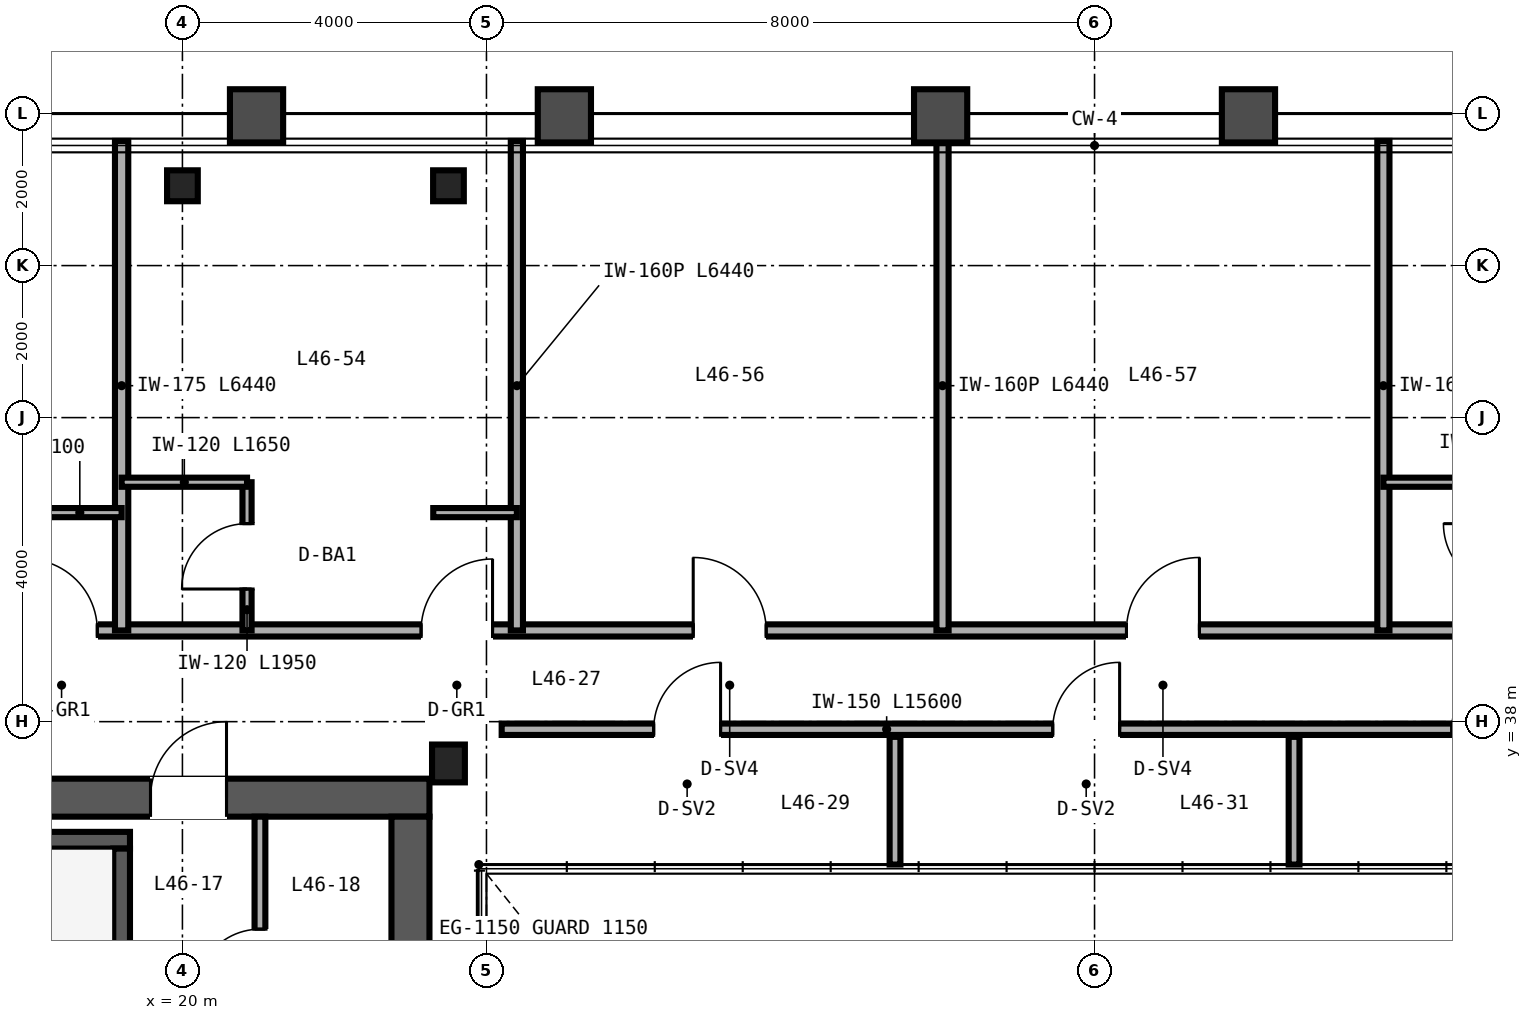
"""IFC4 building model, lengths in metres.
Left out: names, types, materials, properties, quantities, classifications, styles, units other than length and angle.
Written with IfcOpenShell. Run it as: python <this file> out.ifc"""

import sys

from ifc_helpers import new_model, si_unit, direction, frame, frame_2d, origin, origin_2d, place, context, subcontext, project, spatial, rectangle, i_section, extrude, source, transform, mapped, element, fill, save


model = new_model("IFC4")
c1 = context("Model", 3, precision=1e-05, world=origin(), true_north=direction((0.0, 1.0)))
c2 = subcontext(c1, "Body", "Model", "MODEL_VIEW")
j1 = project(units=[si_unit("LENGTHUNIT", "METRE"), si_unit("PLANEANGLEUNIT", "RADIAN")], contexts=[c1])
p1 = place(None, origin())
s1 = spatial("IfcSite", under=j1, at=p1, CompositionType="ELEMENT")
p2 = place(p1, origin())
s2 = spatial("IfcBuilding", under=s1, at=p2, CompositionType="ELEMENT")
p3 = place(p2, frame((0.0, 0.0, 184.8)))
s3 = spatial("IfcBuildingStorey", under=s2, at=p3, CompositionType="ELEMENT", Elevation=184.8)
p4 = place(p3, frame((10.75, 37.0, 0.0), z_axis=(0.0, 0.0, 1.0), x_axis=(1.0, 0.0, 0.0)))
e1 = element("IfcWall", 1, at=p4, inside=s3, PredefinedType="SHEAR", context=c2, shape_type="SweptSolid", body=[
    extrude(rectangle(XDim=12.5, YDim=0.5, at=frame_2d((6.25, 0.0))), origin(), (0.0, 0.0, 1.0), 3.37),
])
p5 = place(p4, frame((8.83, 0.0, 0.0)))
e2 = element("IfcOpeningElement", 2, at=p5, cuts=e1, PredefinedType="OPENING", context=c2, shape_type="SweptSolid", body=[
    extrude(rectangle(XDim=1.0, YDim=2.15, at=frame_2d((0.5, 1.075))), frame((0.0, 0.26, 0.0), z_axis=(0.0, -1.0, 0.0), x_axis=(1.0, 0.0, 0.0)), (0.0, 0.0, 1.0), 0.52),
])
p6 = place(p3, frame((23.0, 15.25, 0.0), z_axis=(0.0, 0.0, 1.0), x_axis=(0.0, 1.0, 0.0)))
e3 = element("IfcWall", 3, at=p6, inside=s3, PredefinedType="SHEAR", context=c2, shape_type="SweptSolid", body=[
    extrude(rectangle(XDim=21.5, YDim=0.5, at=frame_2d((10.75, 0.0))), origin(), (0.0, 0.0, 1.0), 3.37),
])
p7 = place(p3, frame((11.25, 36.44, 0.0), z_axis=(0.0, 0.0, 1.0), x_axis=(1.0, 0.0, 0.0)))
e4 = element("IfcWall", 4, at=p7, inside=s3, PredefinedType="SHEAR", context=c2, shape_type="SweptSolid", body=[
    extrude(rectangle(XDim=8.06, YDim=0.22, at=frame_2d((4.03, 0.0))), origin(), (0.0, 0.0, 1.0), 3.4),
])
p8 = place(p3, frame((19.2, 33.05, 0.0), z_axis=(0.0, 0.0, 1.0), x_axis=(0.0, 1.0, 0.0)))
e5 = element("IfcWall", 5, at=p8, inside=s3, PredefinedType="SHEAR", context=c2, shape_type="SweptSolid", body=[
    extrude(rectangle(XDim=3.28, YDim=0.22, at=frame_2d((1.64, 0.0))), origin(), (0.0, 0.0, 1.0), 3.4),
])
m1 = source(origin(), c2, "Body", "SweptSolid", [
    extrude(i_section(OverallWidth=0.432, OverallDepth=0.498, WebThickness=0.056, FlangeThickness=0.089, FilletRadius=0.025, at=origin_2d()), origin(), (0.0, 0.0, 1.0), 3.37),
])
p9 = place(p3, frame((23.5, 37.45, 0.0), z_axis=(0.0, 0.0, 1.0), x_axis=(1.0, 0.0, 0.0)))
e6 = element("IfcColumn", 6, at=p9, inside=s3, PredefinedType="COLUMN", context=c2, shape_type="MappedRepresentation", body=[
    mapped(m1, transform((0.0, 0.0, 0.0), scale=1.0)),
])
m2 = source(origin(), c2, "Body", "SweptSolid", [
    extrude(i_section(OverallWidth=0.404, OverallDepth=0.407, WebThickness=0.027, FlangeThickness=0.044, FilletRadius=0.025, at=origin_2d()), origin(), (0.0, 0.0, 1.0), 3.37),
])
for number, where, z_axis, x_axis in (
    (7, (20.0, 45.05, 0.0), (0.0, 0.0, 1.0), (1.0, 0.0, 0.0)),
    (8, (23.5, 45.05, 0.0), (0.0, 0.0, 1.0), (1.0, 0.0, 0.0)),
):
    element("IfcColumn", number, at=place(p3, frame(where, z_axis=z_axis, x_axis=x_axis)), inside=s3, PredefinedType="COLUMN", context=c2, shape_type="MappedRepresentation", body=[
        mapped(m2, transform((0.0, 0.0, 0.0), scale=1.0)),
    ])
p10 = place(p3, frame((21.02, 33.28, 0.0), z_axis=(0.0, 0.0, 1.0), x_axis=(0.0, 1.0, 0.0)))
e9 = element("IfcWall", 9, at=p10, inside=s3, PredefinedType="PARTITIONING", context=c2, shape_type="SweptSolid", body=[
    extrude(rectangle(XDim=3.47, YDim=0.142, at=frame_2d((1.735, 0.0))), origin(), (0.0, 0.0, 1.0), 3.37),
])
p11 = place(p10, frame((1.15, 0.0, 0.0)))
e10 = element("IfcOpeningElement", 10, at=p11, cuts=e9, PredefinedType="OPENING", context=c2, shape_type="SweptSolid", body=[
    extrude(rectangle(XDim=0.84, YDim=2.1, at=frame_2d((0.42, 1.05))), frame((0.0, 0.081, 0.0), z_axis=(0.0, -1.0, 0.0), x_axis=(1.0, 0.0, 0.0)), (0.0, 0.0, 1.0), 0.162),
])
p12 = place(p3, frame((24.2, 37.9, 0.0), z_axis=(0.0, 0.0, 1.0), x_axis=(1.0, 0.0, 0.0)))
e11 = element("IfcWall", 11, at=p12, inside=s3, PredefinedType="PARTITIONING", context=c2, shape_type="SweptSolid", body=[
    extrude(rectangle(XDim=15.6, YDim=0.15, at=frame_2d((7.8, 0.0))), origin(), (0.0, 0.0, 1.0), 3.37),
])
p13 = place(p12, frame((2.0, 0.0, 0.0)))
e12 = element("IfcOpeningElement", 12, at=p13, cuts=e11, PredefinedType="OPENING", context=c2, shape_type="SweptSolid", body=[
    extrude(rectangle(XDim=0.88, YDim=2.15, at=frame_2d((0.44, 1.075))), frame((0.0, 0.085, 0.0), z_axis=(0.0, -1.0, 0.0), x_axis=(1.0, 0.0, 0.0)), (0.0, 0.0, 1.0), 0.17),
])
p14 = place(p12, frame((7.25, 0.0, 0.0)))
e13 = element("IfcOpeningElement", 13, at=p14, cuts=e11, PredefinedType="OPENING", context=c2, shape_type="SweptSolid", body=[
    extrude(rectangle(XDim=0.88, YDim=2.15, at=frame_2d((0.44, 1.075))), frame((0.0, 0.085, 0.0), z_axis=(0.0, -1.0, 0.0), x_axis=(1.0, 0.0, 0.0)), (0.0, 0.0, 1.0), 0.17),
])
p15 = place(p12, frame((12.5, 0.0, 0.0)))
e14 = element("IfcOpeningElement", 14, at=p15, cuts=e11, PredefinedType="OPENING", context=c2, shape_type="SweptSolid", body=[
    extrude(rectangle(XDim=0.88, YDim=2.15, at=frame_2d((0.44, 1.075))), frame((0.0, 0.085, 0.0), z_axis=(0.0, -1.0, 0.0), x_axis=(1.0, 0.0, 0.0)), (0.0, 0.0, 1.0), 0.17),
])
for number, where, z_axis, x_axis in (
    (15, (29.375, 36.12, 0.0), (0.0, 0.0, 1.0), (0.0, 1.0, 0.0)),
    (16, (34.625, 36.12, 0.0), (0.0, 0.0, 1.0), (0.0, 1.0, 0.0)),
):
    element("IfcWall", number, at=place(p3, frame(where, z_axis=z_axis, x_axis=x_axis)), inside=s3, PredefinedType="PARTITIONING", context=c2, shape_type="SweptSolid", body=[
        extrude(rectangle(XDim=1.68, YDim=0.142, at=frame_2d((0.84, 0.0))), origin(), (0.0, 0.0, 1.0), 3.37),
    ])
p16 = place(p3, frame((14.0, 39.2, 0.0), z_axis=(0.0, 0.0, 1.0), x_axis=(1.0, 0.0, 0.0)))
e17 = element("IfcWall", 17, at=p16, inside=s3, PredefinedType="PARTITIONING", context=c2, shape_type="SweptSolid", body=[
    extrude(rectangle(XDim=36.0, YDim=0.16, at=frame_2d((18.0, 0.0))), origin(), (0.0, 0.0, 1.0), 2.913),
])
p17 = place(p16, frame((3.94, 0.0, 0.0)))
e18 = element("IfcOpeningElement", 18, at=p17, cuts=e17, PredefinedType="OPENING", context=c2, shape_type="SweptSolid", body=[
    extrude(rectangle(XDim=0.94, YDim=2.15, at=frame_2d((0.47, 1.075))), frame((0.0, 0.09, 0.0), z_axis=(0.0, -1.0, 0.0), x_axis=(1.0, 0.0, 0.0)), (0.0, 0.0, 1.0), 0.18),
])
p18 = place(p16, frame((9.14, 0.0, 0.0)))
e19 = element("IfcOpeningElement", 19, at=p18, cuts=e17, PredefinedType="OPENING", context=c2, shape_type="SweptSolid", body=[
    extrude(rectangle(XDim=0.94, YDim=2.15, at=frame_2d((0.47, 1.075))), frame((0.0, 0.09, 0.0), z_axis=(0.0, -1.0, 0.0), x_axis=(1.0, 0.0, 0.0)), (0.0, 0.0, 1.0), 0.18),
])
p19 = place(p16, frame((12.72, 0.0, 0.0)))
e20 = element("IfcOpeningElement", 20, at=p19, cuts=e17, PredefinedType="OPENING", context=c2, shape_type="SweptSolid", body=[
    extrude(rectangle(XDim=0.96, YDim=2.15, at=frame_2d((0.48, 1.075))), frame((0.0, 0.09, 0.0), z_axis=(0.0, -1.0, 0.0), x_axis=(1.0, 0.0, 0.0)), (0.0, 0.0, 1.0), 0.18),
])
p20 = place(p16, frame((18.42, 0.0, 0.0)))
e21 = element("IfcOpeningElement", 21, at=p20, cuts=e17, PredefinedType="OPENING", context=c2, shape_type="SweptSolid", body=[
    extrude(rectangle(XDim=0.96, YDim=2.15, at=frame_2d((0.48, 1.075))), frame((0.0, 0.09, 0.0), z_axis=(0.0, -1.0, 0.0), x_axis=(1.0, 0.0, 0.0)), (0.0, 0.0, 1.0), 0.18),
])
p21 = place(p16, frame((26.34, 0.0, 0.0)))
e22 = element("IfcOpeningElement", 22, at=p21, cuts=e17, PredefinedType="OPENING", context=c2, shape_type="SweptSolid", body=[
    extrude(rectangle(XDim=0.94, YDim=2.15, at=frame_2d((0.47, 1.075))), frame((0.0, 0.09, 0.0), z_axis=(0.0, -1.0, 0.0), x_axis=(1.0, 0.0, 0.0)), (0.0, 0.0, 1.0), 0.18),
])
p22 = place(p16, frame((30.54, 0.0, 0.0)))
e23 = element("IfcOpeningElement", 23, at=p22, cuts=e17, PredefinedType="OPENING", context=c2, shape_type="SweptSolid", body=[
    extrude(rectangle(XDim=0.94, YDim=2.15, at=frame_2d((0.47, 1.075))), frame((0.0, 0.09, 0.0), z_axis=(0.0, -1.0, 0.0), x_axis=(1.0, 0.0, 0.0)), (0.0, 0.0, 1.0), 0.18),
])
p23 = place(p16, frame((34.74, 0.0, 0.0)))
e24 = element("IfcOpeningElement", 24, at=p23, cuts=e17, PredefinedType="OPENING", context=c2, shape_type="SweptSolid", body=[
    extrude(rectangle(XDim=0.94, YDim=2.15, at=frame_2d((0.47, 1.075))), frame((0.0, 0.09, 0.0), z_axis=(0.0, -1.0, 0.0), x_axis=(1.0, 0.0, 0.0)), (0.0, 0.0, 1.0), 0.18),
])
p24 = place(p3, frame((19.2, 39.2, 0.0), z_axis=(0.0, 0.0, 1.0), x_axis=(0.0, 1.0, 0.0)))
e25 = element("IfcWall", 25, at=p24, inside=s3, PredefinedType="PARTITIONING", context=c2, shape_type="SweptSolid", body=[
    extrude(rectangle(XDim=6.44, YDim=0.175, at=frame_2d((3.22, 0.0))), origin(), (0.0, 0.0, 1.0), 2.677),
])
p25 = place(p3, frame((18.1, 40.75, 0.0), z_axis=(0.0, 0.0, 1.0), x_axis=(1.0, 0.0, 0.0)))
e26 = element("IfcWall", 26, at=p25, inside=s3, PredefinedType="PARTITIONING", context=c2, shape_type="SweptSolid", body=[
    extrude(rectangle(XDim=1.1, YDim=0.12, at=frame_2d((0.55, 0.0))), origin(), (0.0, 0.0, 1.0), 3.37),
])
p26 = place(p3, frame((24.4, 39.2, 0.0), z_axis=(0.0, 0.0, 1.0), x_axis=(0.0, 1.0, 0.0)))
e27 = element("IfcWall", 27, at=p26, inside=s3, PredefinedType="PARTITIONING", context=c2, shape_type="SweptSolid", body=[
    extrude(rectangle(XDim=6.44, YDim=0.16, at=frame_2d((3.22, 0.0))), origin(), (0.0, 0.0, 1.0), 2.443),
])
p27 = place(p3, frame((20.85, 39.2, 0.0), z_axis=(0.0, 0.0, 1.0), x_axis=(0.0, 1.0, 0.0)))
e28 = element("IfcWall", 28, at=p27, inside=s3, PredefinedType="PARTITIONING", context=c2, shape_type="SweptSolid", body=[
    extrude(rectangle(XDim=1.95, YDim=0.12, at=frame_2d((0.975, 0.0))), origin(), (0.0, 0.0, 1.0), 3.37),
])
p28 = place(p27, frame((0.545, 0.0, 0.0)))
e29 = element("IfcOpeningElement", 29, at=p28, cuts=e28, PredefinedType="OPENING", context=c2, shape_type="SweptSolid", body=[
    extrude(rectangle(XDim=0.86, YDim=2.1, at=frame_2d((0.43, 1.05))), frame((0.0, 0.07, 0.0), z_axis=(0.0, -1.0, 0.0), x_axis=(1.0, 0.0, 0.0)), (0.0, 0.0, 1.0), 0.14),
])
p29 = place(p3, frame((19.2, 41.15, 0.0), z_axis=(0.0, 0.0, 1.0), x_axis=(1.0, 0.0, 0.0)))
e30 = element("IfcWall", 30, at=p29, inside=s3, PredefinedType="PARTITIONING", context=c2, shape_type="SweptSolid", body=[
    extrude(rectangle(XDim=1.65, YDim=0.12, at=frame_2d((0.825, 0.0))), origin(), (0.0, 0.0, 1.0), 3.37),
])
p30 = place(p3, frame((23.3, 40.75, 0.0), z_axis=(0.0, 0.0, 1.0), x_axis=(1.0, 0.0, 0.0)))
e31 = element("IfcWall", 31, at=p30, inside=s3, PredefinedType="PARTITIONING", context=c2, shape_type="SweptSolid", body=[
    extrude(rectangle(XDim=1.1, YDim=0.12, at=frame_2d((0.55, 0.0))), origin(), (0.0, 0.0, 1.0), 2.913),
])
for number, where, z_axis, x_axis in (
    (32, (30.0, 39.2, 0.0), (0.0, 0.0, 1.0), (0.0, 1.0, 0.0)),
    (33, (35.8, 39.2, 0.0), (0.0, 0.0, 1.0), (0.0, 1.0, 0.0)),
):
    element("IfcWall", number, at=place(p3, frame(where, z_axis=z_axis, x_axis=x_axis)), inside=s3, PredefinedType="PARTITIONING", context=c2, shape_type="SweptSolid", body=[
        extrude(rectangle(XDim=6.44, YDim=0.16, at=frame_2d((3.22, 0.0))), origin(), (0.0, 0.0, 1.0), 2.443),
    ])
p31 = place(p3, frame((35.8, 41.15, 0.0), z_axis=(0.0, 0.0, 1.0), x_axis=(1.0, 0.0, 0.0)))
e34 = element("IfcWall", 34, at=p31, inside=s3, PredefinedType="PARTITIONING", context=c2, shape_type="SweptSolid", body=[
    extrude(rectangle(XDim=1.65, YDim=0.12, at=frame_2d((0.825, 0.0))), origin(), (0.0, 0.0, 1.0), 3.37),
])
m3 = source(origin(), c2, "Body", "SweptSolid", [
    extrude(rectangle(XDim=0.84, YDim=2.1, at=frame_2d((0.42, 1.05))), frame((0.0, 0.025, 0.0), z_axis=(0.0, -1.0, 0.0), x_axis=(1.0, 0.0, 0.0)), (0.0, 0.0, 1.0), 0.05),
])
p32 = place(p11, origin())
e35 = element("IfcDoor", 35, at=p32, inside=s3, OperationType="SINGLE_SWING_LEFT", PredefinedType="DOOR", context=c2, shape_type="MappedRepresentation", body=[
    mapped(m3, transform((0.0, 0.0, 0.0), scale=1.0)),
])
fill(e10, e35)
m4 = source(origin(), c2, "Body", "SweptSolid", [
    extrude(rectangle(XDim=1.0, YDim=2.15, at=frame_2d((0.5, 1.075))), frame((0.0, 0.025, 0.0), z_axis=(0.0, -1.0, 0.0), x_axis=(1.0, 0.0, 0.0)), (0.0, 0.0, 1.0), 0.05),
])
p33 = place(p5, origin())
e36 = element("IfcDoor", 36, at=p33, inside=s3, OperationType="SINGLE_SWING_RIGHT", PredefinedType="DOOR", context=c2, shape_type="MappedRepresentation", body=[
    mapped(m4, transform((0.0, 0.0, 0.0), scale=1.0)),
])
fill(e2, e36)
m5 = source(origin(), c2, "Body", "SweptSolid", [
    extrude(rectangle(XDim=0.88, YDim=2.15, at=frame_2d((0.44, 1.075))), frame((0.0, 0.025, 0.0), z_axis=(0.0, -1.0, 0.0), x_axis=(1.0, 0.0, 0.0)), (0.0, 0.0, 1.0), 0.05),
])
p34 = place(p13, origin())
e37 = element("IfcDoor", 37, at=p34, inside=s3, OperationType="SINGLE_SWING_RIGHT", PredefinedType="DOOR", context=c2, shape_type="MappedRepresentation", body=[
    mapped(m5, transform((0.0, 0.0, 0.0), scale=1.0)),
])
fill(e12, e37)
p35 = place(p14, origin())
e38 = element("IfcDoor", 38, at=p35, inside=s3, OperationType="SINGLE_SWING_RIGHT", PredefinedType="DOOR", context=c2, shape_type="MappedRepresentation", body=[
    mapped(m5, transform((0.0, 0.0, 0.0), scale=1.0)),
])
fill(e13, e38)
p36 = place(p15, origin())
e39 = element("IfcDoor", 39, at=p36, inside=s3, OperationType="SINGLE_SWING_RIGHT", PredefinedType="DOOR", context=c2, shape_type="MappedRepresentation", body=[
    mapped(m5, transform((0.0, 0.0, 0.0), scale=1.0)),
])
fill(e14, e39)
m6 = source(origin(), c2, "Body", "SweptSolid", [
    extrude(rectangle(XDim=0.86, YDim=2.1, at=frame_2d((0.43, 1.05))), frame((0.0, 0.025, 0.0), z_axis=(0.0, -1.0, 0.0), x_axis=(1.0, 0.0, 0.0)), (0.0, 0.0, 1.0), 0.05),
])
p37 = place(p28, origin())
e40 = element("IfcDoor", 40, at=p37, inside=s3, OperationType="SINGLE_SWING_LEFT", PredefinedType="DOOR", context=c2, shape_type="MappedRepresentation", body=[
    mapped(m6, transform((0.0, 0.0, 0.0), scale=1.0)),
])
fill(e29, e40)
m7 = source(origin(), c2, "Body", "SweptSolid", [
    extrude(rectangle(XDim=0.94, YDim=2.15, at=frame_2d((0.47, 1.075))), frame((0.0, 0.025, 0.0), z_axis=(0.0, -1.0, 0.0), x_axis=(1.0, 0.0, 0.0)), (0.0, 0.0, 1.0), 0.05),
])
p38 = place(p17, origin())
e41 = element("IfcDoor", 41, at=p38, inside=s3, OperationType="SINGLE_SWING_LEFT", PredefinedType="DOOR", context=c2, shape_type="MappedRepresentation", body=[
    mapped(m7, transform((0.0, 0.0, 0.0), scale=1.0)),
])
fill(e18, e41)
p39 = place(p18, origin())
e42 = element("IfcDoor", 42, at=p39, inside=s3, OperationType="SINGLE_SWING_RIGHT", PredefinedType="DOOR", context=c2, shape_type="MappedRepresentation", body=[
    mapped(m7, transform((0.0, 0.0, 0.0), scale=1.0)),
])
fill(e19, e42)
m8 = source(origin(), c2, "Body", "SweptSolid", [
    extrude(rectangle(XDim=0.96, YDim=2.15, at=frame_2d((0.48, 1.075))), frame((0.0, 0.025, 0.0), z_axis=(0.0, -1.0, 0.0), x_axis=(1.0, 0.0, 0.0)), (0.0, 0.0, 1.0), 0.05),
])
p40 = place(p19, origin())
e43 = element("IfcDoor", 43, at=p40, inside=s3, OperationType="SINGLE_SWING_LEFT", PredefinedType="DOOR", context=c2, shape_type="MappedRepresentation", body=[
    mapped(m8, transform((0.0, 0.0, 0.0), scale=1.0)),
])
fill(e20, e43)
p41 = place(p20, origin())
e44 = element("IfcDoor", 44, at=p41, inside=s3, OperationType="SINGLE_SWING_RIGHT", PredefinedType="DOOR", context=c2, shape_type="MappedRepresentation", body=[
    mapped(m8, transform((0.0, 0.0, 0.0), scale=1.0)),
])
fill(e21, e44)
save(model, sys.argv[1])
